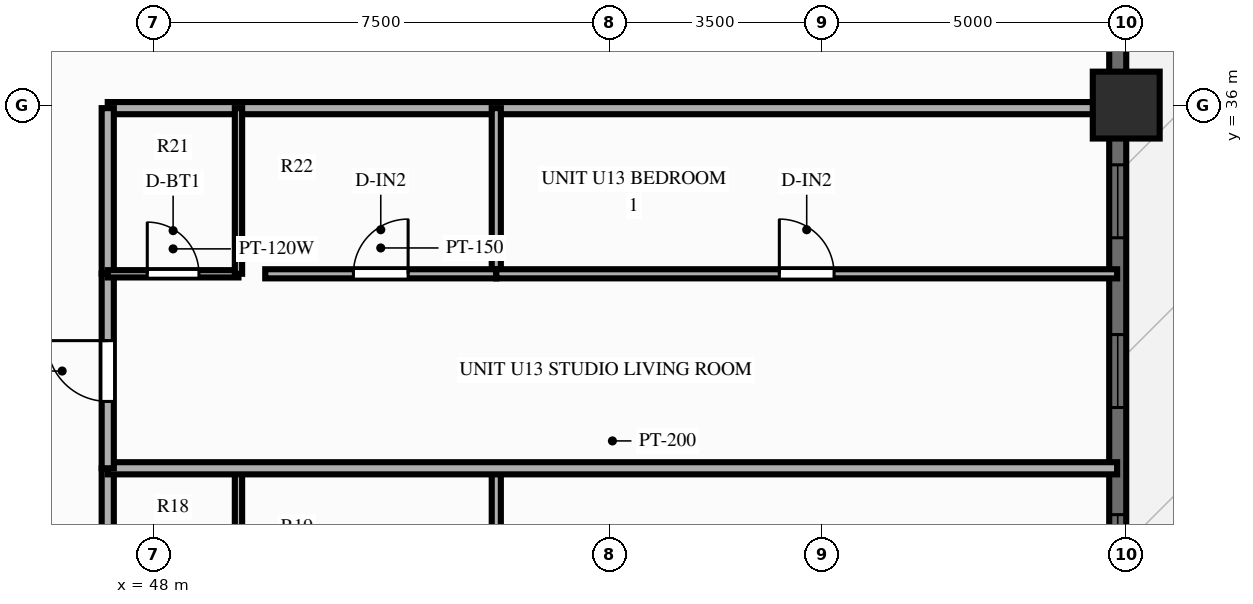
"""IFC4 building model, lengths in metres.
Left out: names, types, materials, properties, quantities, classifications, styles, units other than length and angle.
Written with IfcOpenShell. Run it as: python <this file> out.ifc"""

import sys

from ifc_helpers import new_model, si_unit, direction, frame, frame_2d, origin, origin_2d, place, context, subcontext, project, spatial, rectangle, extrude, source, transform, mapped, element, fill, save


model = new_model("IFC4")
c1 = context("Model", 3, precision=1e-05, world=origin(), true_north=direction((0.0, 1.0)))
c2 = subcontext(c1, "Body", "Model", "MODEL_VIEW")
j1 = project(units=[si_unit("LENGTHUNIT", "METRE"), si_unit("PLANEANGLEUNIT", "RADIAN")], contexts=[c1])
p1 = place(None, origin())
s1 = spatial("IfcSite", under=j1, at=p1, CompositionType="ELEMENT")
p2 = place(p1, origin())
s2 = spatial("IfcBuilding", under=s1, at=p2, CompositionType="ELEMENT")
p3 = place(p2, frame((0.0, 0.0, 43.4)))
s3 = spatial("IfcBuildingStorey", under=s2, at=p3, CompositionType="ELEMENT", Elevation=43.4)
m1 = source(origin(), c2, "Body", "SweptSolid", [
    extrude(rectangle(XDim=1.1, YDim=1.1, at=origin_2d()), origin(), (0.0, 0.0, 1.0), 3.0),
])
p4 = place(p3, frame((64.0, 36.0, 0.0), z_axis=(0.0, 0.0, 1.0), x_axis=(1.0, 0.0, 0.0)))
e1 = element("IfcColumn", 1, at=p4, inside=s3, PredefinedType="COLUMN", context=c2, shape_type="MappedRepresentation", body=[
    mapped(m1, transform((0.0, 0.0, 0.0), scale=1.0)),
])
p5 = place(p3, frame((63.86, 6.5, 0.0), z_axis=(0.0, 0.0, 1.0), x_axis=(0.0, 1.0, 0.0)))
e2 = element("IfcWall", 2, at=p5, inside=s3, PredefinedType="SOLIDWALL", context=c2, shape_type="SweptSolid", body=[
    extrude(rectangle(XDim=41.0, YDim=0.28, at=frame_2d((20.5, 0.0))), origin(), (0.0, 0.0, 1.0), 2.28),
])
p6 = place(p5, frame((5.15, 0.0, 0.25)))
e3 = element("IfcOpeningElement", 3, at=p6, cuts=e2, PredefinedType="OPENING", context=c2, shape_type="SweptSolid", body=[
    extrude(rectangle(XDim=1.2, YDim=1.5, at=frame_2d((0.6, 0.75))), frame((0.0, 0.152, 0.0), z_axis=(0.0, -1.0, 0.0), x_axis=(1.0, 0.0, 0.0)), (0.0, 0.0, 1.0), 0.304),
])
p7 = place(p5, frame((12.499, 0.0, 0.25)))
e4 = element("IfcOpeningElement", 4, at=p7, cuts=e2, PredefinedType="OPENING", context=c2, shape_type="SweptSolid", body=[
    extrude(rectangle(XDim=1.2, YDim=1.5, at=frame_2d((0.6, 0.75))), frame((0.0, 0.152, 0.0), z_axis=(0.0, -1.0, 0.0), x_axis=(1.0, 0.0, 0.0)), (0.0, 0.0, 1.0), 0.304),
])
p8 = place(p5, frame((15.355, 0.0, 0.25)))
e5 = element("IfcOpeningElement", 5, at=p8, cuts=e2, PredefinedType="OPENING", context=c2, shape_type="SweptSolid", body=[
    extrude(rectangle(XDim=1.2, YDim=1.5, at=frame_2d((0.6, 0.75))), frame((0.0, 0.152, 0.0), z_axis=(0.0, -1.0, 0.0), x_axis=(1.0, 0.0, 0.0)), (0.0, 0.0, 1.0), 0.304),
])
p9 = place(p5, frame((18.602, 0.0, 0.25)))
e6 = element("IfcOpeningElement", 6, at=p9, cuts=e2, PredefinedType="OPENING", context=c2, shape_type="SweptSolid", body=[
    extrude(rectangle(XDim=1.2, YDim=1.5, at=frame_2d((0.6, 0.75))), frame((0.0, 0.152, 0.0), z_axis=(0.0, -1.0, 0.0), x_axis=(1.0, 0.0, 0.0)), (0.0, 0.0, 1.0), 0.304),
])
p10 = place(p5, frame((21.564, 0.0, 0.25)))
e7 = element("IfcOpeningElement", 7, at=p10, cuts=e2, PredefinedType="OPENING", context=c2, shape_type="SweptSolid", body=[
    extrude(rectangle(XDim=1.2, YDim=1.5, at=frame_2d((0.6, 0.75))), frame((0.0, 0.152, 0.0), z_axis=(0.0, -1.0, 0.0), x_axis=(1.0, 0.0, 0.0)), (0.0, 0.0, 1.0), 0.304),
])
p11 = place(p5, frame((24.526, 0.0, 0.25)))
e8 = element("IfcOpeningElement", 8, at=p11, cuts=e2, PredefinedType="OPENING", context=c2, shape_type="SweptSolid", body=[
    extrude(rectangle(XDim=1.2, YDim=1.5, at=frame_2d((0.6, 0.75))), frame((0.0, 0.152, 0.0), z_axis=(0.0, -1.0, 0.0), x_axis=(1.0, 0.0, 0.0)), (0.0, 0.0, 1.0), 0.304),
])
p12 = place(p5, frame((27.318, 0.0, 0.25)))
e9 = element("IfcOpeningElement", 9, at=p12, cuts=e2, PredefinedType="OPENING", context=c2, shape_type="SweptSolid", body=[
    extrude(rectangle(XDim=1.2, YDim=1.5, at=frame_2d((0.6, 0.75))), frame((0.0, 0.152, 0.0), z_axis=(0.0, -1.0, 0.0), x_axis=(1.0, 0.0, 0.0)), (0.0, 0.0, 1.0), 0.304),
])
p13 = place(p5, frame((36.05, 0.0, 0.0), z_axis=(0.0, 0.0, 1.0), x_axis=(-1.0, 0.0, 0.0)))
e10 = element("IfcOpeningElement", 10, at=p13, cuts=e2, PredefinedType="OPENING", context=c2, shape_type="SweptSolid", body=[
    extrude(rectangle(XDim=1.6, YDim=2.15, at=frame_2d((0.8, 1.075))), frame((0.0, 0.152, 0.0), z_axis=(0.0, -1.0, 0.0), x_axis=(1.0, 0.0, 0.0)), (0.0, 0.0, 1.0), 0.304),
])
p14 = place(p3, frame((47.25, 35.95, 0.0), z_axis=(0.0, 0.0, 1.0), x_axis=(1.0, 0.0, 0.0)))
e11 = element("IfcWall", 11, at=p14, inside=s3, PredefinedType="PARTITIONING", context=c2, shape_type="SweptSolid", body=[
    extrude(rectangle(XDim=16.6, YDim=0.2, at=frame_2d((8.3, 0.0))), origin(), (0.0, 0.0, 1.0), 2.24),
])
p15 = place(p3, frame((47.25, 27.302, 0.0), z_axis=(0.0, 0.0, 1.0), x_axis=(0.0, 1.0, 0.0)))
e12 = element("IfcWall", 12, at=p15, inside=s3, PredefinedType="PARTITIONING", context=c2, shape_type="SweptSolid", body=[
    extrude(rectangle(XDim=2.725, YDim=0.2, at=frame_2d((1.362, 0.0))), origin(), (0.0, 0.0, 1.0), 2.79),
])
p16 = place(p3, frame((49.4, 27.302, 0.0), z_axis=(0.0, 0.0, 1.0), x_axis=(0.0, 1.0, 0.0)))
e13 = element("IfcWall", 13, at=p16, inside=s3, PredefinedType="PARTITIONING", context=c2, shape_type="SweptSolid", body=[
    extrude(rectangle(XDim=2.725, YDim=0.12, at=frame_2d((1.362, 0.0))), origin(), (0.0, 0.0, 1.0), 2.79),
])
p17 = place(p3, frame((53.64, 27.302, 0.0), z_axis=(0.0, 0.0, 1.0), x_axis=(0.0, 1.0, 0.0)))
e14 = element("IfcWall", 14, at=p17, inside=s3, PredefinedType="PARTITIONING", context=c2, shape_type="SweptSolid", body=[
    extrude(rectangle(XDim=2.725, YDim=0.15, at=frame_2d((1.362, 0.0))), origin(), (0.0, 0.0, 1.0), 2.79),
])
p18 = place(p3, frame((47.25, 30.027, 0.0), z_axis=(0.0, 0.0, 1.0), x_axis=(1.0, 0.0, 0.0)))
e15 = element("IfcWall", 15, at=p18, inside=s3, PredefinedType="PARTITIONING", context=c2, shape_type="SweptSolid", body=[
    extrude(rectangle(XDim=16.6, YDim=0.2, at=frame_2d((8.3, 0.0))), origin(), (0.0, 0.0, 1.0), 2.79),
])
p19 = place(p3, frame((47.25, 30.027, 0.0), z_axis=(0.0, 0.0, 1.0), x_axis=(0.0, 1.0, 0.0)))
e16 = element("IfcWall", 16, at=p19, inside=s3, PredefinedType="PARTITIONING", context=c2, shape_type="SweptSolid", body=[
    extrude(rectangle(XDim=3.198, YDim=0.2, at=frame_2d((1.599, 0.0))), origin(), (0.0, 0.0, 1.0), 2.79),
])
p20 = place(p19, frame((1.099, 0.0, 0.0)))
e17 = element("IfcOpeningElement", 17, at=p20, cuts=e16, PredefinedType="OPENING", context=c2, shape_type="SweptSolid", body=[
    extrude(rectangle(XDim=1.0, YDim=2.15, at=frame_2d((0.5, 1.075))), frame((0.0, 0.112, 0.0), z_axis=(0.0, -1.0, 0.0), x_axis=(1.0, 0.0, 0.0)), (0.0, 0.0, 1.0), 0.224),
])
p21 = place(p3, frame((47.25, 33.225, 0.0), z_axis=(0.0, 0.0, 1.0), x_axis=(0.0, 1.0, 0.0)))
e18 = element("IfcWall", 18, at=p21, inside=s3, PredefinedType="PARTITIONING", context=c2, shape_type="SweptSolid", body=[
    extrude(rectangle(XDim=2.725, YDim=0.2, at=frame_2d((1.362, 0.0))), origin(), (0.0, 0.0, 1.0), 2.79),
])
p22 = place(p3, frame((47.25, 33.225, 0.0), z_axis=(0.0, 0.0, 1.0), x_axis=(1.0, 0.0, 0.0)))
e19 = element("IfcWall", 19, at=p22, inside=s3, PredefinedType="PARTITIONING", context=c2, shape_type="SweptSolid", body=[
    extrude(rectangle(XDim=2.15, YDim=0.12, at=frame_2d((1.075, 0.0))), origin(), (0.0, 0.0, 1.0), 2.79),
])
p23 = place(p22, frame((0.65, 0.0, 0.0)))
e20 = element("IfcOpeningElement", 20, at=p23, cuts=e19, PredefinedType="OPENING", context=c2, shape_type="SweptSolid", body=[
    extrude(rectangle(XDim=0.85, YDim=2.05, at=frame_2d((0.425, 1.025))), frame((0.0, 0.072, 0.0), z_axis=(0.0, -1.0, 0.0), x_axis=(1.0, 0.0, 0.0)), (0.0, 0.0, 1.0), 0.144),
])
p24 = place(p3, frame((49.4, 33.225, 0.0), z_axis=(0.0, 0.0, 1.0), x_axis=(0.0, 1.0, 0.0)))
e21 = element("IfcWall", 21, at=p24, inside=s3, PredefinedType="PARTITIONING", context=c2, shape_type="SweptSolid", body=[
    extrude(rectangle(XDim=2.725, YDim=0.12, at=frame_2d((1.362, 0.0))), origin(), (0.0, 0.0, 1.0), 2.79),
])
p25 = place(p3, frame((53.64, 33.225, 0.0), z_axis=(0.0, 0.0, 1.0), x_axis=(0.0, 1.0, 0.0)))
e22 = element("IfcWall", 22, at=p25, inside=s3, PredefinedType="PARTITIONING", context=c2, shape_type="SweptSolid", body=[
    extrude(rectangle(XDim=2.725, YDim=0.15, at=frame_2d((1.362, 0.0))), origin(), (0.0, 0.0, 1.0), 2.79),
])
p26 = place(p3, frame((49.84, 33.225, 0.0), z_axis=(0.0, 0.0, 1.0), x_axis=(1.0, 0.0, 0.0)))
e23 = element("IfcWall", 23, at=p26, inside=s3, PredefinedType="PARTITIONING", context=c2, shape_type="SweptSolid", body=[
    extrude(rectangle(XDim=3.8, YDim=0.15, at=frame_2d((1.9, 0.0))), origin(), (0.0, 0.0, 1.0), 2.79),
])
p27 = place(p26, frame((1.45, 0.0, 0.0)))
e24 = element("IfcOpeningElement", 24, at=p27, cuts=e23, PredefinedType="OPENING", context=c2, shape_type="SweptSolid", body=[
    extrude(rectangle(XDim=0.9, YDim=2.1, at=frame_2d((0.45, 1.05))), frame((0.0, 0.087, 0.0), z_axis=(0.0, -1.0, 0.0), x_axis=(1.0, 0.0, 0.0)), (0.0, 0.0, 1.0), 0.174),
])
p28 = place(p3, frame((53.64, 33.225, 0.0), z_axis=(0.0, 0.0, 1.0), x_axis=(1.0, 0.0, 0.0)))
e25 = element("IfcWall", 25, at=p28, inside=s3, PredefinedType="PARTITIONING", context=c2, shape_type="SweptSolid", body=[
    extrude(rectangle(XDim=10.21, YDim=0.15, at=frame_2d((5.105, 0.0))), origin(), (0.0, 0.0, 1.0), 2.79),
])
p29 = place(p28, frame((4.655, 0.0, 0.0)))
e26 = element("IfcOpeningElement", 26, at=p29, cuts=e25, PredefinedType="OPENING", context=c2, shape_type="SweptSolid", body=[
    extrude(rectangle(XDim=0.9, YDim=2.1, at=frame_2d((0.45, 1.05))), frame((0.0, 0.087, 0.0), z_axis=(0.0, -1.0, 0.0), x_axis=(1.0, 0.0, 0.0)), (0.0, 0.0, 1.0), 0.174),
])
m2 = source(origin(), c2, "Body", "SweptSolid", [
    extrude(rectangle(XDim=1.2, YDim=1.5, at=frame_2d((0.6, 0.75))), frame((0.0, 0.03, 0.0), z_axis=(0.0, -1.0, 0.0), x_axis=(1.0, 0.0, 0.0)), (0.0, 0.0, 1.0), 0.06),
])
p30 = place(p10, origin())
e27 = element("IfcWindow", 27, at=p30, inside=s3, PartitioningType="SINGLE_PANEL", PredefinedType="WINDOW", context=c2, shape_type="MappedRepresentation", body=[
    mapped(m2, transform((0.0, 0.0, 0.0), scale=1.0)),
])
fill(e7, e27)
p31 = place(p11, origin())
e28 = element("IfcWindow", 28, at=p31, inside=s3, PartitioningType="SINGLE_PANEL", PredefinedType="WINDOW", context=c2, shape_type="MappedRepresentation", body=[
    mapped(m2, transform((0.0, 0.0, 0.0), scale=1.0)),
])
fill(e8, e28)
p32 = place(p12, origin())
e29 = element("IfcWindow", 29, at=p32, inside=s3, PartitioningType="SINGLE_PANEL", PredefinedType="WINDOW", context=c2, shape_type="MappedRepresentation", body=[
    mapped(m2, transform((0.0, 0.0, 0.0), scale=1.0)),
])
fill(e9, e29)
m3 = source(origin(), c2, "Body", "SweptSolid", [
    extrude(rectangle(XDim=1.0, YDim=2.15, at=frame_2d((0.5, 1.075))), frame((0.0, 0.025, 0.0), z_axis=(0.0, -1.0, 0.0), x_axis=(1.0, 0.0, 0.0)), (0.0, 0.0, 1.0), 0.05),
])
p33 = place(p20, origin())
e30 = element("IfcDoor", 30, at=p33, inside=s3, OperationType="SINGLE_SWING_RIGHT", PredefinedType="DOOR", context=c2, shape_type="MappedRepresentation", body=[
    mapped(m3, transform((0.0, 0.0, 0.0), scale=1.0)),
])
fill(e17, e30)
m4 = source(origin(), c2, "Body", "SweptSolid", [
    extrude(rectangle(XDim=0.85, YDim=2.05, at=frame_2d((0.425, 1.025))), frame((0.0, 0.025, 0.0), z_axis=(0.0, -1.0, 0.0), x_axis=(1.0, 0.0, 0.0)), (0.0, 0.0, 1.0), 0.05),
])
p34 = place(p23, origin())
e31 = element("IfcDoor", 31, at=p34, inside=s3, OperationType="SINGLE_SWING_LEFT", PredefinedType="DOOR", context=c2, shape_type="MappedRepresentation", body=[
    mapped(m4, transform((0.0, 0.0, 0.0), scale=1.0)),
])
fill(e20, e31)
m5 = source(origin(), c2, "Body", "SweptSolid", [
    extrude(rectangle(XDim=0.9, YDim=2.1, at=frame_2d((0.45, 1.05))), frame((0.0, 0.025, 0.0), z_axis=(0.0, -1.0, 0.0), x_axis=(1.0, 0.0, 0.0)), (0.0, 0.0, 1.0), 0.05),
])
p35 = place(p27, origin())
e32 = element("IfcDoor", 32, at=p35, inside=s3, OperationType="SINGLE_SWING_RIGHT", PredefinedType="DOOR", context=c2, shape_type="MappedRepresentation", body=[
    mapped(m5, transform((0.0, 0.0, 0.0), scale=1.0)),
])
fill(e24, e32)
p36 = place(p29, origin())
e33 = element("IfcDoor", 33, at=p36, inside=s3, OperationType="SINGLE_SWING_LEFT", PredefinedType="DOOR", context=c2, shape_type="MappedRepresentation", body=[
    mapped(m5, transform((0.0, 0.0, 0.0), scale=1.0)),
])
fill(e26, e33)
save(model, sys.argv[1])
